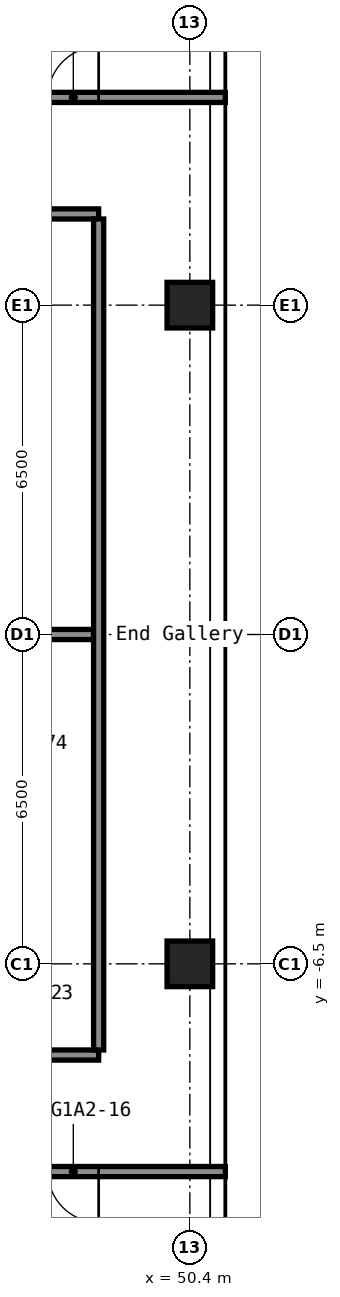
"""IFC4 building model, lengths in metres.
Left out: names, types, materials, properties, quantities, classifications, styles, units other than length and angle.
Written with IfcOpenShell. Run it as: python <this file> out.ifc"""

import sys

from ifc_helpers import new_model, si_unit, direction, frame, frame_2d, origin, origin_2d, place, context, subcontext, project, spatial, rectangle, hollow_rectangle, extrude, element, fill, save


model = new_model("IFC4")
c1 = context("Model", 3, precision=1e-05, world=origin(), true_north=direction((0.0, 1.0)))
c2 = subcontext(c1, "Body", "Model", "MODEL_VIEW")
j1 = project(units=[si_unit("LENGTHUNIT", "METRE"), si_unit("PLANEANGLEUNIT", "RADIAN")], contexts=[c1])
p1 = place(None, origin())
s1 = spatial("IfcSite", under=j1, at=p1, CompositionType="ELEMENT")
p2 = place(p1, origin())
s2 = spatial("IfcBuilding", under=s1, at=p2, CompositionType="ELEMENT")
p3 = place(p2, frame((0.0, 0.0, 51.8)))
s3 = spatial("IfcBuildingStorey", under=s2, at=p3, CompositionType="ELEMENT", Elevation=51.8)
for number, where, z_axis, x_axis in (
    (1, (50.4, -6.5, 0.0), (0.0, 0.0, 1.0), (1.0, 0.0, 0.0)),
    (2, (50.4, 6.5, 0.0), (0.0, 0.0, 1.0), (1.0, 0.0, 0.0)),
):
    element("IfcColumn", number, at=place(p3, frame(where, z_axis=z_axis, x_axis=x_axis)), inside=s3, PredefinedType="COLUMN", context=c2, shape_type="SweptSolid", body=[
        extrude(hollow_rectangle(XDim=0.9, YDim=0.9, WallThickness=0.036, at=origin_2d()), origin(), (0.0, 0.0, 1.0), 2.8),
    ])
p4 = place(p3, frame((16.8, -10.6, 0.0), z_axis=(0.0, 0.0, 1.0), x_axis=(1.0, 0.0, 0.0)))
e3 = element("IfcWall", 3, at=p4, inside=s3, PredefinedType="PARTITIONING", context=c2, shape_type="SweptSolid", body=[
    extrude(rectangle(XDim=34.3, YDim=0.2, at=frame_2d((17.15, 0.0))), origin(), (0.0, 0.0, 1.0), 2.8),
])
p5 = place(p4, frame((5.4, 0.0, 0.0)))
e4 = element("IfcOpeningElement", 4, at=p5, cuts=e3, PredefinedType="OPENING", context=c2, shape_type="SweptSolid", body=[
    extrude(rectangle(XDim=1.0, YDim=2.1, at=frame_2d((0.5, 1.05))), frame((0.0, 0.11, 0.0), z_axis=(0.0, -1.0, 0.0), x_axis=(1.0, 0.0, 0.0)), (0.0, 0.0, 1.0), 0.22),
])
p6 = place(p4, frame((13.8, 0.0, 0.0)))
e5 = element("IfcOpeningElement", 5, at=p6, cuts=e3, PredefinedType="OPENING", context=c2, shape_type="SweptSolid", body=[
    extrude(rectangle(XDim=1.0, YDim=2.1, at=frame_2d((0.5, 1.05))), frame((0.0, 0.11, 0.0), z_axis=(0.0, -1.0, 0.0), x_axis=(1.0, 0.0, 0.0)), (0.0, 0.0, 1.0), 0.22),
])
p7 = place(p4, frame((18.8, 0.0, 0.0)))
e6 = element("IfcOpeningElement", 6, at=p7, cuts=e3, PredefinedType="OPENING", context=c2, shape_type="SweptSolid", body=[
    extrude(rectangle(XDim=1.0, YDim=2.1, at=frame_2d((0.5, 1.05))), frame((0.0, 0.11, 0.0), z_axis=(0.0, -1.0, 0.0), x_axis=(1.0, 0.0, 0.0)), (0.0, 0.0, 1.0), 0.22),
])
p8 = place(p4, frame((30.8, 0.0, 0.0)))
e7 = element("IfcOpeningElement", 7, at=p8, cuts=e3, PredefinedType="OPENING", context=c2, shape_type="SweptSolid", body=[
    extrude(rectangle(XDim=1.0, YDim=2.1, at=frame_2d((0.5, 1.05))), frame((0.0, 0.11, 0.0), z_axis=(0.0, -1.0, 0.0), x_axis=(1.0, 0.0, 0.0)), (0.0, 0.0, 1.0), 0.22),
])
p9 = place(p3, frame((33.6, -8.3, 0.0), z_axis=(0.0, 0.0, 1.0), x_axis=(1.0, 0.0, 0.0)))
e8 = element("IfcWall", 8, at=p9, inside=s3, PredefinedType="PARTITIONING", context=c2, shape_type="SweptSolid", body=[
    extrude(rectangle(XDim=15.0, YDim=0.2, at=frame_2d((7.5, 0.0))), origin(), (0.0, 0.0, 1.0), 2.8),
])
p10 = place(p9, frame((2.0, 0.0, 0.0)))
e9 = element("IfcOpeningElement", 9, at=p10, cuts=e8, PredefinedType="OPENING", context=c2, shape_type="SweptSolid", body=[
    extrude(rectangle(XDim=1.0, YDim=2.1, at=frame_2d((0.5, 1.05))), frame((0.0, 0.11, 0.0), z_axis=(0.0, -1.0, 0.0), x_axis=(1.0, 0.0, 0.0)), (0.0, 0.0, 1.0), 0.22),
])
p11 = place(p9, frame((12.85, 0.0, 0.0)))
e10 = element("IfcOpeningElement", 10, at=p11, cuts=e8, PredefinedType="OPENING", context=c2, shape_type="SweptSolid", body=[
    extrude(rectangle(XDim=1.0, YDim=2.1, at=frame_2d((0.5, 1.05))), frame((0.0, 0.11, 0.0), z_axis=(0.0, -1.0, 0.0), x_axis=(1.0, 0.0, 0.0)), (0.0, 0.0, 1.0), 0.22),
])
p12 = place(p3, frame((33.6, 0.0, 0.0), z_axis=(0.0, 0.0, 1.0), x_axis=(1.0, 0.0, 0.0)))
e11 = element("IfcWall", 11, at=p12, inside=s3, PredefinedType="PARTITIONING", context=c2, shape_type="SweptSolid", body=[
    extrude(rectangle(XDim=14.9, YDim=0.2, at=frame_2d((7.45, 0.0))), origin(), (0.0, 0.0, 1.0), 2.8),
])
p13 = place(p3, frame((33.6, 8.3, 0.0), z_axis=(0.0, 0.0, 1.0), x_axis=(1.0, 0.0, 0.0)))
e12 = element("IfcWall", 12, at=p13, inside=s3, PredefinedType="PARTITIONING", context=c2, shape_type="SweptSolid", body=[
    extrude(rectangle(XDim=15.0, YDim=0.2, at=frame_2d((7.5, 0.0))), origin(), (0.0, 0.0, 1.0), 2.8),
])
p14 = place(p13, frame((9.55, 0.0, 0.0)))
e13 = element("IfcOpeningElement", 13, at=p14, cuts=e12, PredefinedType="OPENING", context=c2, shape_type="SweptSolid", body=[
    extrude(rectangle(XDim=1.6, YDim=2.1, at=frame_2d((0.8, 1.05))), frame((0.0, 0.11, 0.0), z_axis=(0.0, -1.0, 0.0), x_axis=(1.0, 0.0, 0.0)), (0.0, 0.0, 1.0), 0.22),
])
p15 = place(p3, frame((16.8, 10.6, 0.0), z_axis=(0.0, 0.0, 1.0), x_axis=(1.0, 0.0, 0.0)))
e14 = element("IfcWall", 14, at=p15, inside=s3, PredefinedType="PARTITIONING", context=c2, shape_type="SweptSolid", body=[
    extrude(rectangle(XDim=34.3, YDim=0.2, at=frame_2d((17.15, 0.0))), origin(), (0.0, 0.0, 1.0), 2.8),
])
p16 = place(p15, frame((5.4, 0.0, 0.0)))
e15 = element("IfcOpeningElement", 15, at=p16, cuts=e14, PredefinedType="OPENING", context=c2, shape_type="SweptSolid", body=[
    extrude(rectangle(XDim=1.0, YDim=2.1, at=frame_2d((0.5, 1.05))), frame((0.0, 0.11, 0.0), z_axis=(0.0, -1.0, 0.0), x_axis=(1.0, 0.0, 0.0)), (0.0, 0.0, 1.0), 0.22),
])
p17 = place(p15, frame((13.8, 0.0, 0.0)))
e16 = element("IfcOpeningElement", 16, at=p17, cuts=e14, PredefinedType="OPENING", context=c2, shape_type="SweptSolid", body=[
    extrude(rectangle(XDim=1.0, YDim=2.1, at=frame_2d((0.5, 1.05))), frame((0.0, 0.11, 0.0), z_axis=(0.0, -1.0, 0.0), x_axis=(1.0, 0.0, 0.0)), (0.0, 0.0, 1.0), 0.22),
])
p18 = place(p15, frame((18.8, 0.0, 0.0)))
e17 = element("IfcOpeningElement", 17, at=p18, cuts=e14, PredefinedType="OPENING", context=c2, shape_type="SweptSolid", body=[
    extrude(rectangle(XDim=1.0, YDim=2.1, at=frame_2d((0.5, 1.05))), frame((0.0, 0.11, 0.0), z_axis=(0.0, -1.0, 0.0), x_axis=(1.0, 0.0, 0.0)), (0.0, 0.0, 1.0), 0.22),
])
p19 = place(p15, frame((30.8, 0.0, 0.0)))
e18 = element("IfcOpeningElement", 18, at=p19, cuts=e14, PredefinedType="OPENING", context=c2, shape_type="SweptSolid", body=[
    extrude(rectangle(XDim=1.0, YDim=2.1, at=frame_2d((0.5, 1.05))), frame((0.0, 0.11, 0.0), z_axis=(0.0, -1.0, 0.0), x_axis=(1.0, 0.0, 0.0)), (0.0, 0.0, 1.0), 0.22),
])
p20 = place(p3, frame((48.6, -8.2, 0.0), z_axis=(0.0, 0.0, 1.0), x_axis=(0.0, 1.0, 0.0)))
e19 = element("IfcWall", 19, at=p20, inside=s3, PredefinedType="PARTITIONING", context=c2, shape_type="SweptSolid", body=[
    extrude(rectangle(XDim=16.4, YDim=0.2, at=frame_2d((8.2, 0.0))), origin(), (0.0, 0.0, 1.0), 2.8),
])
p21 = place(p8, origin())
e20 = element("IfcDoor", 20, at=p21, inside=s3, OperationType="SINGLE_SWING_RIGHT", PredefinedType="DOOR", context=c2, shape_type="SweptSolid", body=[
    extrude(rectangle(XDim=1.0, YDim=2.1, at=frame_2d((0.5, 1.05))), frame((0.0, 0.025, 0.0), z_axis=(0.0, -1.0, 0.0), x_axis=(1.0, 0.0, 0.0)), (0.0, 0.0, 1.0), 0.05),
])
fill(e7, e20)
p22 = place(p19, origin())
e21 = element("IfcDoor", 21, at=p22, inside=s3, OperationType="SINGLE_SWING_LEFT", PredefinedType="DOOR", context=c2, shape_type="SweptSolid", body=[
    extrude(rectangle(XDim=1.0, YDim=2.1, at=frame_2d((0.5, 1.05))), frame((0.0, 0.025, 0.0), z_axis=(0.0, -1.0, 0.0), x_axis=(1.0, 0.0, 0.0)), (0.0, 0.0, 1.0), 0.05),
])
fill(e18, e21)
save(model, sys.argv[1])
